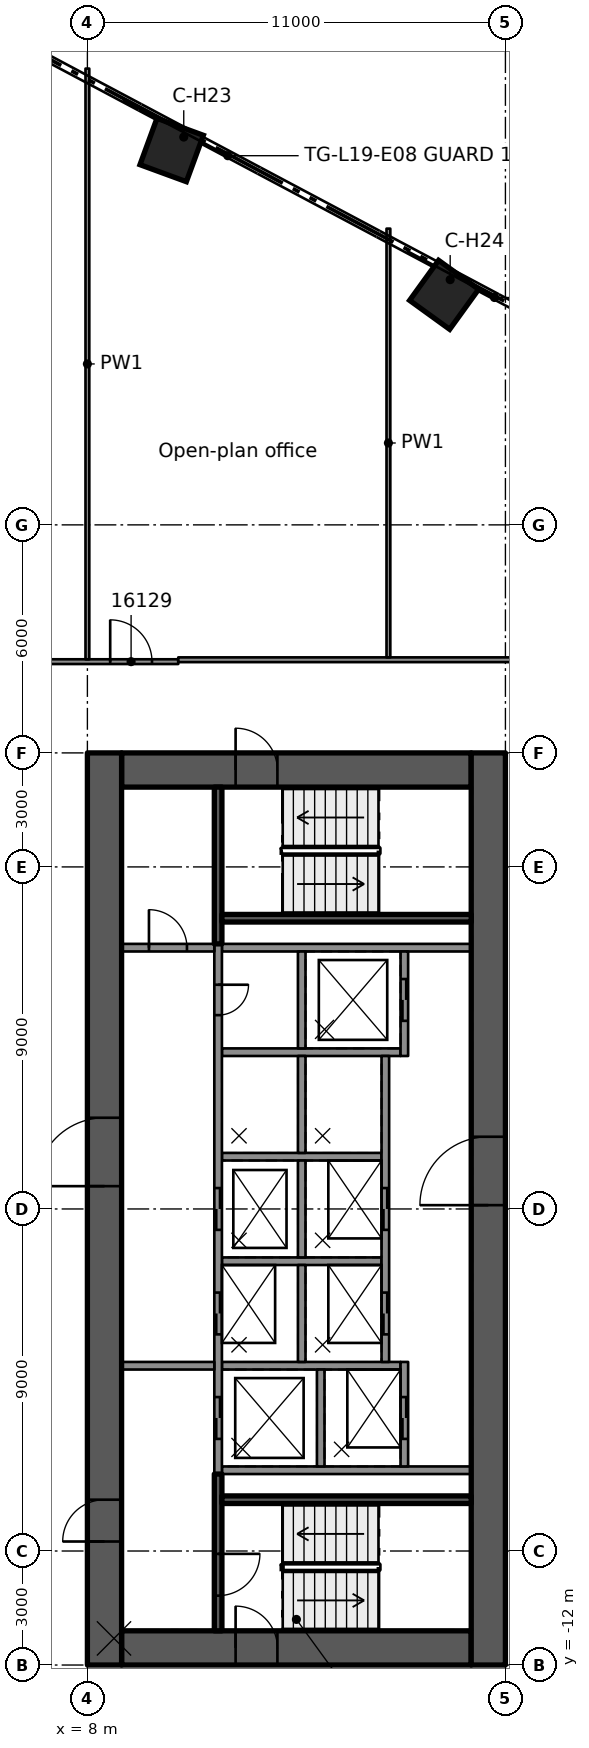
"""IFC4 building model, lengths in metres.
Left out: names, types, materials, properties, quantities, classifications, styles, units other than length and angle.
Written with IfcOpenShell. Run it as: python <this file> out.ifc"""

import sys

from ifc_helpers import new_model, si_unit, direction, frame, frame_2d, origin, origin_2d, place, context, subcontext, project, spatial, rectangle, extrude, element, fill, save


model = new_model("IFC4")
c1 = context("Model", 3, precision=1e-05, world=origin(), true_north=direction((0.0, 1.0)))
c2 = subcontext(c1, "Body", "Model", "MODEL_VIEW")
j1 = project(units=[si_unit("LENGTHUNIT", "METRE"), si_unit("PLANEANGLEUNIT", "RADIAN")], contexts=[c1])
p1 = place(None, origin())
s1 = spatial("IfcSite", under=j1, at=p1, CompositionType="ELEMENT")
p2 = place(p1, origin())
s2 = spatial("IfcBuilding", under=s1, at=p2, CompositionType="ELEMENT")
p3 = place(p2, frame((0.0, 0.0, 80.7)))
s3 = spatial("IfcBuildingStorey", under=s2, at=p3, CompositionType="ELEMENT", Elevation=80.7)
p4 = place(p3, frame((8.9, 11.55, 0.0), z_axis=(0.0, 0.0, 1.0), x_axis=(1.0, 0.0, 0.0)))
e1 = element("IfcWall", 1, at=p4, inside=s3, PredefinedType="SHEAR", context=c2, shape_type="SweptSolid", body=[
    extrude(rectangle(XDim=9.2, YDim=0.9, at=frame_2d((4.6, 0.0))), origin(), (0.0, 0.0, 1.0), 3.5),
])
p5 = place(p4, frame((3.0, 0.0, 0.0)))
e2 = element("IfcOpeningElement", 2, at=p5, cuts=e1, PredefinedType="OPENING", context=c2, shape_type="SweptSolid", body=[
    extrude(rectangle(XDim=1.1, YDim=2.1, at=frame_2d((0.55, 1.05))), frame((0.0, 0.46, 0.0), z_axis=(0.0, -1.0, 0.0), x_axis=(1.0, 0.0, 0.0)), (0.0, 0.0, 1.0), 0.92),
])
p6 = place(p3, frame((8.9, -11.55, 0.0), z_axis=(0.0, 0.0, 1.0), x_axis=(1.0, 0.0, 0.0)))
e3 = element("IfcWall", 3, at=p6, inside=s3, PredefinedType="SHEAR", context=c2, shape_type="SweptSolid", body=[
    extrude(rectangle(XDim=9.2, YDim=0.9, at=frame_2d((4.6, 0.0))), origin(), (0.0, 0.0, 1.0), 3.5),
])
p7 = place(p6, frame((3.0, 0.0, 0.0)))
e4 = element("IfcOpeningElement", 4, at=p7, cuts=e3, PredefinedType="OPENING", context=c2, shape_type="SweptSolid", body=[
    extrude(rectangle(XDim=1.1, YDim=2.1, at=frame_2d((0.55, 1.05))), frame((0.0, 0.46, 0.0), z_axis=(0.0, -1.0, 0.0), x_axis=(1.0, 0.0, 0.0)), (0.0, 0.0, 1.0), 0.92),
])
p8 = place(p3, frame((8.45, -12.0, 0.0), z_axis=(0.0, 0.0, 1.0), x_axis=(0.0, 1.0, 0.0)))
e5 = element("IfcWall", 5, at=p8, inside=s3, PredefinedType="SHEAR", context=c2, shape_type="SweptSolid", body=[
    extrude(rectangle(XDim=24.0, YDim=0.9, at=frame_2d((12.0, 0.0))), origin(), (0.0, 0.0, 1.0), 3.5),
])
p9 = place(p8, frame((12.6, 0.0, 0.0)))
e6 = element("IfcOpeningElement", 6, at=p9, cuts=e5, PredefinedType="OPENING", context=c2, shape_type="SweptSolid", body=[
    extrude(rectangle(XDim=1.8, YDim=2.1, at=frame_2d((0.9, 1.05))), frame((0.0, 0.46, 0.0), z_axis=(0.0, -1.0, 0.0), x_axis=(1.0, 0.0, 0.0)), (0.0, 0.0, 1.0), 0.92),
])
p10 = place(p8, frame((3.25, 0.0, 0.0)))
e7 = element("IfcOpeningElement", 7, at=p10, cuts=e5, PredefinedType="OPENING", context=c2, shape_type="SweptSolid", body=[
    extrude(rectangle(XDim=1.1, YDim=2.1, at=frame_2d((0.55, 1.05))), frame((0.0, 0.46, 0.0), z_axis=(0.0, -1.0, 0.0), x_axis=(1.0, 0.0, 0.0)), (0.0, 0.0, 1.0), 0.92),
])
p11 = place(p3, frame((18.55, -12.0, 0.0), z_axis=(0.0, 0.0, 1.0), x_axis=(0.0, 1.0, 0.0)))
e8 = element("IfcWall", 8, at=p11, inside=s3, PredefinedType="SHEAR", context=c2, shape_type="SweptSolid", body=[
    extrude(rectangle(XDim=24.0, YDim=0.9, at=frame_2d((12.0, 0.0))), origin(), (0.0, 0.0, 1.0), 3.5),
])
p12 = place(p11, frame((12.1, 0.0, 0.0)))
e9 = element("IfcOpeningElement", 9, at=p12, cuts=e8, PredefinedType="OPENING", context=c2, shape_type="SweptSolid", body=[
    extrude(rectangle(XDim=1.8, YDim=2.1, at=frame_2d((0.9, 1.05))), frame((0.0, 0.46, 0.0), z_axis=(0.0, -1.0, 0.0), x_axis=(1.0, 0.0, 0.0)), (0.0, 0.0, 1.0), 0.92),
])
for number, where, z_axis, x_axis in (
    (10, (10.218, 27.864, 0.0), (0.0, 0.0, 1.0), (0.344, 0.939, 0.0)),
    (11, (17.387, 24.053, 0.0), (0.0, 0.0, 1.0), (0.586, 0.81, 0.0)),
):
    element("IfcColumn", number, at=place(p3, frame(where, z_axis=z_axis, x_axis=x_axis)), inside=s3, PredefinedType="COLUMN", context=c2, shape_type="SweptSolid", body=[
        extrude(rectangle(XDim=1.3, YDim=1.3, at=origin_2d()), origin(), (0.0, 0.0, 1.0), 3.5),
    ])
for number, where, z_axis, x_axis in (
    (12, (11.54, -6.875, 0.0), (0.0, 0.0, 1.0), (1.0, 0.0, 0.0)),
    (13, (11.54, 6.875, 0.0), (0.0, 0.0, 1.0), (1.0, 0.0, 0.0)),
):
    element("IfcWall", number, at=place(p3, frame(where, z_axis=z_axis, x_axis=x_axis)), inside=s3, PredefinedType="SOLIDWALL", context=c2, shape_type="SweptSolid", body=[
        extrude(rectangle(XDim=6.56, YDim=0.2, at=frame_2d((3.28, 0.0))), origin(), (0.0, 0.0, 1.0), 3.09),
    ])
p13 = place(p3, frame((11.54, 4.125, 0.0), z_axis=(0.0, 0.0, 1.0), x_axis=(1.0, 0.0, 0.0)))
e14 = element("IfcWall", 14, at=p13, inside=s3, PredefinedType="SOLIDWALL", context=c2, shape_type="SweptSolid", body=[
    extrude(rectangle(XDim=4.7, YDim=0.2, at=frame_2d((2.35, 0.0))), origin(), (0.0, 0.0, 1.0), 3.09),
])
for number, where, z_axis, x_axis in (
    (15, (11.54, 1.375, 0.0), (0.0, 0.0, 1.0), (1.0, 0.0, 0.0)),
    (16, (11.54, -1.375, 0.0), (0.0, 0.0, 1.0), (1.0, 0.0, 0.0)),
):
    element("IfcWall", number, at=place(p3, frame(where, z_axis=z_axis, x_axis=x_axis)), inside=s3, PredefinedType="SOLIDWALL", context=c2, shape_type="SweptSolid", body=[
        extrude(rectangle(XDim=4.2, YDim=0.2, at=frame_2d((2.1, 0.0))), origin(), (0.0, 0.0, 1.0), 3.09),
    ])
p14 = place(p3, frame((11.54, -4.125, 0.0), z_axis=(0.0, 0.0, 1.0), x_axis=(1.0, 0.0, 0.0)))
e17 = element("IfcWall", 17, at=p14, inside=s3, PredefinedType="SOLIDWALL", context=c2, shape_type="SweptSolid", body=[
    extrude(rectangle(XDim=4.7, YDim=0.2, at=frame_2d((2.35, 0.0))), origin(), (0.0, 0.0, 1.0), 3.09),
])
p15 = place(p3, frame((11.44, 6.975, 0.0), z_axis=(0.0, 0.0, 1.0), x_axis=(0.0, -1.0, 0.0)))
e18 = element("IfcWall", 18, at=p15, inside=s3, PredefinedType="SOLIDWALL", context=c2, shape_type="SweptSolid", body=[
    extrude(rectangle(XDim=13.95, YDim=0.2, at=frame_2d((6.975, 0.0))), origin(), (0.0, 0.0, 1.0), 3.09),
])
p16 = place(p15, frame((6.425, 0.0, 0.0)))
e19 = element("IfcOpeningElement", 19, at=p16, cuts=e18, PredefinedType="OPENING", context=c2, shape_type="SweptSolid", body=[
    extrude(rectangle(XDim=1.1, YDim=2.1, at=frame_2d((0.55, 1.05))), frame((0.0, 0.11, 0.0), z_axis=(0.0, -1.0, 0.0), x_axis=(1.0, 0.0, 0.0)), (0.0, 0.0, 1.0), 0.22),
])
p17 = place(p15, frame((9.175, 0.0, 0.0)))
e20 = element("IfcOpeningElement", 20, at=p17, cuts=e18, PredefinedType="OPENING", context=c2, shape_type="SweptSolid", body=[
    extrude(rectangle(XDim=1.1, YDim=2.1, at=frame_2d((0.55, 1.05))), frame((0.0, 0.11, 0.0), z_axis=(0.0, -1.0, 0.0), x_axis=(1.0, 0.0, 0.0)), (0.0, 0.0, 1.0), 0.22),
])
p18 = place(p15, frame((11.925, 0.0, 0.0)))
e21 = element("IfcOpeningElement", 21, at=p18, cuts=e18, PredefinedType="OPENING", context=c2, shape_type="SweptSolid", body=[
    extrude(rectangle(XDim=1.1, YDim=2.1, at=frame_2d((0.55, 1.05))), frame((0.0, 0.11, 0.0), z_axis=(0.0, -1.0, 0.0), x_axis=(1.0, 0.0, 0.0)), (0.0, 0.0, 1.0), 0.22),
])
p19 = place(p15, frame((1.075, 0.0, 0.0)))
e22 = element("IfcOpeningElement", 22, at=p19, cuts=e18, PredefinedType="OPENING", context=c2, shape_type="SweptSolid", body=[
    extrude(rectangle(XDim=0.8, YDim=2.1, at=frame_2d((0.4, 1.05))), frame((0.0, 0.11, 0.0), z_axis=(0.0, -1.0, 0.0), x_axis=(1.0, 0.0, 0.0)), (0.0, 0.0, 1.0), 0.22),
])
for number, where, z_axis, x_axis in (
    (23, (13.64, 6.775, 0.0), (0.0, 0.0, 1.0), (0.0, -1.0, 0.0)),
    (24, (13.64, 4.025, 0.0), (0.0, 0.0, 1.0), (0.0, -1.0, 0.0)),
    (25, (13.64, 1.275, 0.0), (0.0, 0.0, 1.0), (0.0, -1.0, 0.0)),
    (26, (13.64, -1.475, 0.0), (0.0, 0.0, 1.0), (0.0, -1.0, 0.0)),
    (27, (14.14, -4.225, 0.0), (0.0, 0.0, 1.0), (0.0, -1.0, 0.0)),
):
    element("IfcWall", number, at=place(p3, frame(where, z_axis=z_axis, x_axis=x_axis)), inside=s3, PredefinedType="SOLIDWALL", context=c2, shape_type="SweptSolid", body=[
        extrude(rectangle(XDim=2.55, YDim=0.2, at=frame_2d((1.275, 0.0))), origin(), (0.0, 0.0, 1.0), 3.09),
    ])
p20 = place(p3, frame((16.34, 6.775, 0.0), z_axis=(0.0, 0.0, 1.0), x_axis=(0.0, -1.0, 0.0)))
e28 = element("IfcWall", 28, at=p20, inside=s3, PredefinedType="SOLIDWALL", context=c2, shape_type="SweptSolid", body=[
    extrude(rectangle(XDim=2.75, YDim=0.2, at=frame_2d((1.375, 0.0))), origin(), (0.0, 0.0, 1.0), 3.09),
])
p21 = place(p20, frame((0.725, 0.0, 0.0)))
e29 = element("IfcOpeningElement", 29, at=p21, cuts=e28, PredefinedType="OPENING", context=c2, shape_type="SweptSolid", body=[
    extrude(rectangle(XDim=1.1, YDim=2.1, at=frame_2d((0.55, 1.05))), frame((0.0, 0.11, 0.0), z_axis=(0.0, -1.0, 0.0), x_axis=(1.0, 0.0, 0.0)), (0.0, 0.0, 1.0), 0.22),
])
p22 = place(p3, frame((15.84, 4.025, 0.0), z_axis=(0.0, 0.0, 1.0), x_axis=(0.0, -1.0, 0.0)))
e30 = element("IfcWall", 30, at=p22, inside=s3, PredefinedType="SOLIDWALL", context=c2, shape_type="SweptSolid", body=[
    extrude(rectangle(XDim=8.05, YDim=0.2, at=frame_2d((4.025, 0.0))), origin(), (0.0, 0.0, 1.0), 3.09),
])
p23 = place(p22, frame((3.475, 0.0, 0.0)))
e31 = element("IfcOpeningElement", 31, at=p23, cuts=e30, PredefinedType="OPENING", context=c2, shape_type="SweptSolid", body=[
    extrude(rectangle(XDim=1.1, YDim=2.1, at=frame_2d((0.55, 1.05))), frame((0.0, 0.11, 0.0), z_axis=(0.0, -1.0, 0.0), x_axis=(1.0, 0.0, 0.0)), (0.0, 0.0, 1.0), 0.22),
])
p24 = place(p22, frame((6.225, 0.0, 0.0)))
e32 = element("IfcOpeningElement", 32, at=p24, cuts=e30, PredefinedType="OPENING", context=c2, shape_type="SweptSolid", body=[
    extrude(rectangle(XDim=1.1, YDim=2.1, at=frame_2d((0.55, 1.05))), frame((0.0, 0.11, 0.0), z_axis=(0.0, -1.0, 0.0), x_axis=(1.0, 0.0, 0.0)), (0.0, 0.0, 1.0), 0.22),
])
p25 = place(p3, frame((16.34, -4.025, 0.0), z_axis=(0.0, 0.0, 1.0), x_axis=(0.0, -1.0, 0.0)))
e33 = element("IfcWall", 33, at=p25, inside=s3, PredefinedType="SOLIDWALL", context=c2, shape_type="SweptSolid", body=[
    extrude(rectangle(XDim=2.75, YDim=0.2, at=frame_2d((1.375, 0.0))), origin(), (0.0, 0.0, 1.0), 3.09),
])
p26 = place(p25, frame((0.925, 0.0, 0.0)))
e34 = element("IfcOpeningElement", 34, at=p26, cuts=e33, PredefinedType="OPENING", context=c2, shape_type="SweptSolid", body=[
    extrude(rectangle(XDim=1.1, YDim=2.1, at=frame_2d((0.55, 1.05))), frame((0.0, 0.11, 0.0), z_axis=(0.0, -1.0, 0.0), x_axis=(1.0, 0.0, 0.0)), (0.0, 0.0, 1.0), 0.22),
])
p27 = place(p3, frame((11.44, -6.975, 0.0), z_axis=(0.0, 0.0, 1.0), x_axis=(0.0, -1.0, 0.0)))
e35 = element("IfcWall", 35, at=p27, inside=s3, PredefinedType="SOLIDWALL", context=c2, shape_type="SweptSolid", body=[
    extrude(rectangle(XDim=4.125, YDim=0.2, at=frame_2d((2.062, 0.0))), origin(), (0.0, 0.0, 1.0), 3.09),
])
p28 = place(p27, frame((2.1, 0.0, 0.0)))
e36 = element("IfcOpeningElement", 36, at=p28, cuts=e35, PredefinedType="OPENING", context=c2, shape_type="SweptSolid", body=[
    extrude(rectangle(XDim=1.1, YDim=2.1, at=frame_2d((0.55, 1.05))), frame((0.0, 0.11, 0.0), z_axis=(0.0, -1.0, 0.0), x_axis=(1.0, 0.0, 0.0)), (0.0, 0.0, 1.0), 0.22),
])
p29 = place(p3, frame((11.54, -7.65, 0.0), z_axis=(0.0, 0.0, 1.0), x_axis=(1.0, 0.0, 0.0)))
e37 = element("IfcWall", 37, at=p29, inside=s3, PredefinedType="SOLIDWALL", context=c2, shape_type="SweptSolid", body=[
    extrude(rectangle(XDim=6.56, YDim=0.2, at=frame_2d((3.28, 0.0))), origin(), (0.0, 0.0, 1.0), 3.09),
])
p30 = place(p3, frame((11.44, 11.1, 0.0), z_axis=(0.0, 0.0, 1.0), x_axis=(0.0, -1.0, 0.0)))
e38 = element("IfcWall", 38, at=p30, inside=s3, PredefinedType="SOLIDWALL", context=c2, shape_type="SweptSolid", body=[
    extrude(rectangle(XDim=4.125, YDim=0.2, at=frame_2d((2.062, 0.0))), origin(), (0.0, 0.0, 1.0), 3.09),
])
p31 = place(p3, frame((11.54, 7.65, 0.0), z_axis=(0.0, 0.0, 1.0), x_axis=(1.0, 0.0, 0.0)))
e39 = element("IfcWall", 39, at=p31, inside=s3, PredefinedType="SOLIDWALL", context=c2, shape_type="SweptSolid", body=[
    extrude(rectangle(XDim=6.56, YDim=0.2, at=frame_2d((3.28, 0.0))), origin(), (0.0, 0.0, 1.0), 3.09),
])
p32 = place(p3, frame((8.9, -4.125, 0.0), z_axis=(0.0, 0.0, 1.0), x_axis=(1.0, 0.0, 0.0)))
e40 = element("IfcWall", 40, at=p32, inside=s3, PredefinedType="PARTITIONING", context=c2, shape_type="SweptSolid", body=[
    extrude(rectangle(XDim=2.44, YDim=0.2, at=frame_2d((1.22, 0.0))), origin(), (0.0, 0.0, 1.0), 3.09),
])
p33 = place(p3, frame((8.9, 6.875, 0.0), z_axis=(0.0, 0.0, 1.0), x_axis=(1.0, 0.0, 0.0)))
e41 = element("IfcWall", 41, at=p33, inside=s3, PredefinedType="PARTITIONING", context=c2, shape_type="SweptSolid", body=[
    extrude(rectangle(XDim=2.44, YDim=0.2, at=frame_2d((1.22, 0.0))), origin(), (0.0, 0.0, 1.0), 3.09),
])
p34 = place(p33, frame((0.72, 0.0, 0.0)))
e42 = element("IfcOpeningElement", 42, at=p34, cuts=e41, PredefinedType="OPENING", context=c2, shape_type="SweptSolid", body=[
    extrude(rectangle(XDim=1.0, YDim=2.1, at=frame_2d((0.5, 1.05))), frame((0.0, 0.11, 0.0), z_axis=(0.0, -1.0, 0.0), x_axis=(1.0, 0.0, 0.0)), (0.0, 0.0, 1.0), 0.22),
])
p35 = place(p3, frame((-10.39, 14.401, 0.0), z_axis=(0.0, 0.0, 1.0), x_axis=(1.0, 0.0, 0.0)))
e43 = element("IfcWall", 43, at=p35, inside=s3, PredefinedType="PARTITIONING", context=c2, shape_type="SweptSolid", body=[
    extrude(rectangle(XDim=20.781, YDim=0.125, at=frame_2d((10.391, 0.0))), origin(), (0.0, 0.0, 1.0), 3.08),
])
p36 = place(p35, frame((18.99, 0.0, 0.0)))
e44 = element("IfcOpeningElement", 44, at=p36, cuts=e43, PredefinedType="OPENING", context=c2, shape_type="SweptSolid", body=[
    extrude(rectangle(XDim=1.1, YDim=2.1, at=frame_2d((0.55, 1.05))), frame((0.0, 0.073, 0.0), z_axis=(0.0, -1.0, 0.0), x_axis=(1.0, 0.0, 0.0)), (0.0, 0.0, 1.0), 0.145),
])
p37 = place(p35, frame((13.49, 0.0, 0.0)))
e45 = element("IfcOpeningElement", 45, at=p37, cuts=e43, PredefinedType="OPENING", context=c2, shape_type="SweptSolid", body=[
    extrude(rectangle(XDim=1.8, YDim=2.1, at=frame_2d((0.9, 1.05))), frame((0.0, 0.073, 0.0), z_axis=(0.0, -1.0, 0.0), x_axis=(1.0, 0.0, 0.0)), (0.0, 0.0, 1.0), 0.145),
])
p38 = place(p35, frame((5.49, 0.0, 0.0)))
e46 = element("IfcOpeningElement", 46, at=p38, cuts=e43, PredefinedType="OPENING", context=c2, shape_type="SweptSolid", body=[
    extrude(rectangle(XDim=1.8, YDim=2.1, at=frame_2d((0.9, 1.05))), frame((0.0, 0.073, 0.0), z_axis=(0.0, -1.0, 0.0), x_axis=(1.0, 0.0, 0.0)), (0.0, 0.0, 1.0), 0.145),
])
p39 = place(p35, frame((0.6, 0.0, 0.0)))
e47 = element("IfcOpeningElement", 47, at=p39, cuts=e43, PredefinedType="OPENING", context=c2, shape_type="SweptSolid", body=[
    extrude(rectangle(XDim=1.1, YDim=2.1, at=frame_2d((0.55, 1.05))), frame((0.0, 0.073, 0.0), z_axis=(0.0, -1.0, 0.0), x_axis=(1.0, 0.0, 0.0)), (0.0, 0.0, 1.0), 0.145),
])
p40 = place(p3, frame((10.391, 14.451, 0.0), z_axis=(0.0, 0.0, 1.0), x_axis=(1.0, 0.0, 0.0)))
e48 = element("IfcWall", 48, at=p40, inside=s3, PredefinedType="PARTITIONING", context=c2, shape_type="SweptSolid", body=[
    extrude(rectangle(XDim=10.996, YDim=0.125, at=frame_2d((5.498, 0.0))), origin(), (0.0, 0.0, 1.0), 3.08),
])
p41 = place(p3, frame((15.921, 14.514, 0.0), z_axis=(0.0, 0.0, 1.0), x_axis=(0.0, 1.0, 0.0)))
e49 = element("IfcWall", 49, at=p41, inside=s3, PredefinedType="PARTITIONING", context=c2, shape_type="SweptSolid", body=[
    extrude(rectangle(XDim=11.281, YDim=0.1, at=frame_2d((5.641, 0.0))), origin(), (0.0, 0.0, 1.0), 3.08),
])
p42 = place(p3, frame((8.0, 14.463, 0.0), z_axis=(0.0, 0.0, 1.0), x_axis=(0.0, 1.0, 0.0)))
e50 = element("IfcWall", 50, at=p42, inside=s3, PredefinedType="PARTITIONING", context=c2, shape_type="SweptSolid", body=[
    extrude(rectangle(XDim=15.543, YDim=0.1, at=frame_2d((7.771, 0.0))), origin(), (0.0, 0.0, 1.0), 3.08),
])
p43 = place(p21, origin())
e51 = element("IfcDoor", 51, at=p43, inside=s3, OperationType="DOUBLE_DOOR_SLIDING", PredefinedType="DOOR", context=c2, shape_type="SweptSolid", body=[
    extrude(rectangle(XDim=1.1, YDim=2.1, at=frame_2d((0.55, 1.05))), frame((0.0, 0.025, 0.0), z_axis=(0.0, -1.0, 0.0), x_axis=(1.0, 0.0, 0.0)), (0.0, 0.0, 1.0), 0.05),
])
fill(e29, e51)
p44 = place(p16, origin())
e52 = element("IfcDoor", 52, at=p44, inside=s3, OperationType="DOUBLE_DOOR_SLIDING", PredefinedType="DOOR", context=c2, shape_type="SweptSolid", body=[
    extrude(rectangle(XDim=1.1, YDim=2.1, at=frame_2d((0.55, 1.05))), frame((0.0, 0.025, 0.0), z_axis=(0.0, -1.0, 0.0), x_axis=(1.0, 0.0, 0.0)), (0.0, 0.0, 1.0), 0.05),
])
fill(e19, e52)
p45 = place(p23, origin())
e53 = element("IfcDoor", 53, at=p45, inside=s3, OperationType="DOUBLE_DOOR_SLIDING", PredefinedType="DOOR", context=c2, shape_type="SweptSolid", body=[
    extrude(rectangle(XDim=1.1, YDim=2.1, at=frame_2d((0.55, 1.05))), frame((0.0, 0.025, 0.0), z_axis=(0.0, -1.0, 0.0), x_axis=(1.0, 0.0, 0.0)), (0.0, 0.0, 1.0), 0.05),
])
fill(e31, e53)
p46 = place(p17, origin())
e54 = element("IfcDoor", 54, at=p46, inside=s3, OperationType="DOUBLE_DOOR_SLIDING", PredefinedType="DOOR", context=c2, shape_type="SweptSolid", body=[
    extrude(rectangle(XDim=1.1, YDim=2.1, at=frame_2d((0.55, 1.05))), frame((0.0, 0.025, 0.0), z_axis=(0.0, -1.0, 0.0), x_axis=(1.0, 0.0, 0.0)), (0.0, 0.0, 1.0), 0.05),
])
fill(e20, e54)
p47 = place(p24, origin())
e55 = element("IfcDoor", 55, at=p47, inside=s3, OperationType="DOUBLE_DOOR_SLIDING", PredefinedType="DOOR", context=c2, shape_type="SweptSolid", body=[
    extrude(rectangle(XDim=1.1, YDim=2.1, at=frame_2d((0.55, 1.05))), frame((0.0, 0.025, 0.0), z_axis=(0.0, -1.0, 0.0), x_axis=(1.0, 0.0, 0.0)), (0.0, 0.0, 1.0), 0.05),
])
fill(e32, e55)
p48 = place(p18, origin())
e56 = element("IfcDoor", 56, at=p48, inside=s3, OperationType="DOUBLE_DOOR_SLIDING", PredefinedType="DOOR", context=c2, shape_type="SweptSolid", body=[
    extrude(rectangle(XDim=1.1, YDim=2.1, at=frame_2d((0.55, 1.05))), frame((0.0, 0.025, 0.0), z_axis=(0.0, -1.0, 0.0), x_axis=(1.0, 0.0, 0.0)), (0.0, 0.0, 1.0), 0.05),
])
fill(e21, e56)
p49 = place(p26, origin())
e57 = element("IfcDoor", 57, at=p49, inside=s3, OperationType="DOUBLE_DOOR_SLIDING", PredefinedType="DOOR", context=c2, shape_type="SweptSolid", body=[
    extrude(rectangle(XDim=1.1, YDim=2.1, at=frame_2d((0.55, 1.05))), frame((0.0, 0.025, 0.0), z_axis=(0.0, -1.0, 0.0), x_axis=(1.0, 0.0, 0.0)), (0.0, 0.0, 1.0), 0.05),
])
fill(e34, e57)
p50 = place(p19, origin())
e58 = element("IfcDoor", 58, at=p50, inside=s3, OperationType="SINGLE_SWING_LEFT", PredefinedType="DOOR", context=c2, shape_type="SweptSolid", body=[
    extrude(rectangle(XDim=0.8, YDim=2.1, at=frame_2d((0.4, 1.05))), frame((0.0, 0.025, 0.0), z_axis=(0.0, -1.0, 0.0), x_axis=(1.0, 0.0, 0.0)), (0.0, 0.0, 1.0), 0.05),
])
fill(e22, e58)
p51 = place(p9, origin())
e59 = element("IfcDoor", 59, at=p51, inside=s3, OperationType="SINGLE_SWING_RIGHT", PredefinedType="DOOR", context=c2, shape_type="SweptSolid", body=[
    extrude(rectangle(XDim=1.8, YDim=2.1, at=frame_2d((0.9, 1.05))), frame((0.0, 0.025, 0.0), z_axis=(0.0, -1.0, 0.0), x_axis=(1.0, 0.0, 0.0)), (0.0, 0.0, 1.0), 0.05),
])
fill(e6, e59)
p52 = place(p12, origin())
e60 = element("IfcDoor", 60, at=p52, inside=s3, OperationType="SINGLE_SWING_RIGHT", PredefinedType="DOOR", context=c2, shape_type="SweptSolid", body=[
    extrude(rectangle(XDim=1.8, YDim=2.1, at=frame_2d((0.9, 1.05))), frame((0.0, 0.025, 0.0), z_axis=(0.0, -1.0, 0.0), x_axis=(1.0, 0.0, 0.0)), (0.0, 0.0, 1.0), 0.05),
])
fill(e9, e60)
p53 = place(p10, origin())
e61 = element("IfcDoor", 61, at=p53, inside=s3, OperationType="SINGLE_SWING_LEFT", PredefinedType="DOOR", context=c2, shape_type="SweptSolid", body=[
    extrude(rectangle(XDim=1.1, YDim=2.1, at=frame_2d((0.55, 1.05))), frame((0.0, 0.025, 0.0), z_axis=(0.0, -1.0, 0.0), x_axis=(1.0, 0.0, 0.0)), (0.0, 0.0, 1.0), 0.05),
])
fill(e7, e61)
p54 = place(p7, origin())
e62 = element("IfcDoor", 62, at=p54, inside=s3, OperationType="SINGLE_SWING_LEFT", PredefinedType="DOOR", context=c2, shape_type="SweptSolid", body=[
    extrude(rectangle(XDim=1.1, YDim=2.1, at=frame_2d((0.55, 1.05))), frame((0.0, 0.025, 0.0), z_axis=(0.0, -1.0, 0.0), x_axis=(1.0, 0.0, 0.0)), (0.0, 0.0, 1.0), 0.05),
])
fill(e4, e62)
p55 = place(p5, origin())
e63 = element("IfcDoor", 63, at=p55, inside=s3, OperationType="SINGLE_SWING_LEFT", PredefinedType="DOOR", context=c2, shape_type="SweptSolid", body=[
    extrude(rectangle(XDim=1.1, YDim=2.1, at=frame_2d((0.55, 1.05))), frame((0.0, 0.025, 0.0), z_axis=(0.0, -1.0, 0.0), x_axis=(1.0, 0.0, 0.0)), (0.0, 0.0, 1.0), 0.05),
])
fill(e2, e63)
p56 = place(p28, origin())
e64 = element("IfcDoor", 64, at=p56, inside=s3, OperationType="SINGLE_SWING_RIGHT", PredefinedType="DOOR", context=c2, shape_type="SweptSolid", body=[
    extrude(rectangle(XDim=1.1, YDim=2.1, at=frame_2d((0.55, 1.05))), frame((0.0, 0.025, 0.0), z_axis=(0.0, -1.0, 0.0), x_axis=(1.0, 0.0, 0.0)), (0.0, 0.0, 1.0), 0.05),
])
fill(e36, e64)
p57 = place(p34, origin())
e65 = element("IfcDoor", 65, at=p57, inside=s3, OperationType="SINGLE_SWING_RIGHT", PredefinedType="DOOR", context=c2, shape_type="SweptSolid", body=[
    extrude(rectangle(XDim=1.0, YDim=2.1, at=frame_2d((0.5, 1.05))), frame((0.0, 0.025, 0.0), z_axis=(0.0, -1.0, 0.0), x_axis=(1.0, 0.0, 0.0)), (0.0, 0.0, 1.0), 0.05),
])
fill(e42, e65)
p58 = place(p36, origin())
e66 = element("IfcDoor", 66, at=p58, inside=s3, OperationType="SINGLE_SWING_RIGHT", PredefinedType="DOOR", context=c2, shape_type="SweptSolid", body=[
    extrude(rectangle(XDim=1.1, YDim=2.1, at=frame_2d((0.55, 1.05))), frame((0.0, 0.025, 0.0), z_axis=(0.0, -1.0, 0.0), x_axis=(1.0, 0.0, 0.0)), (0.0, 0.0, 1.0), 0.05),
])
fill(e44, e66)
save(model, sys.argv[1])
